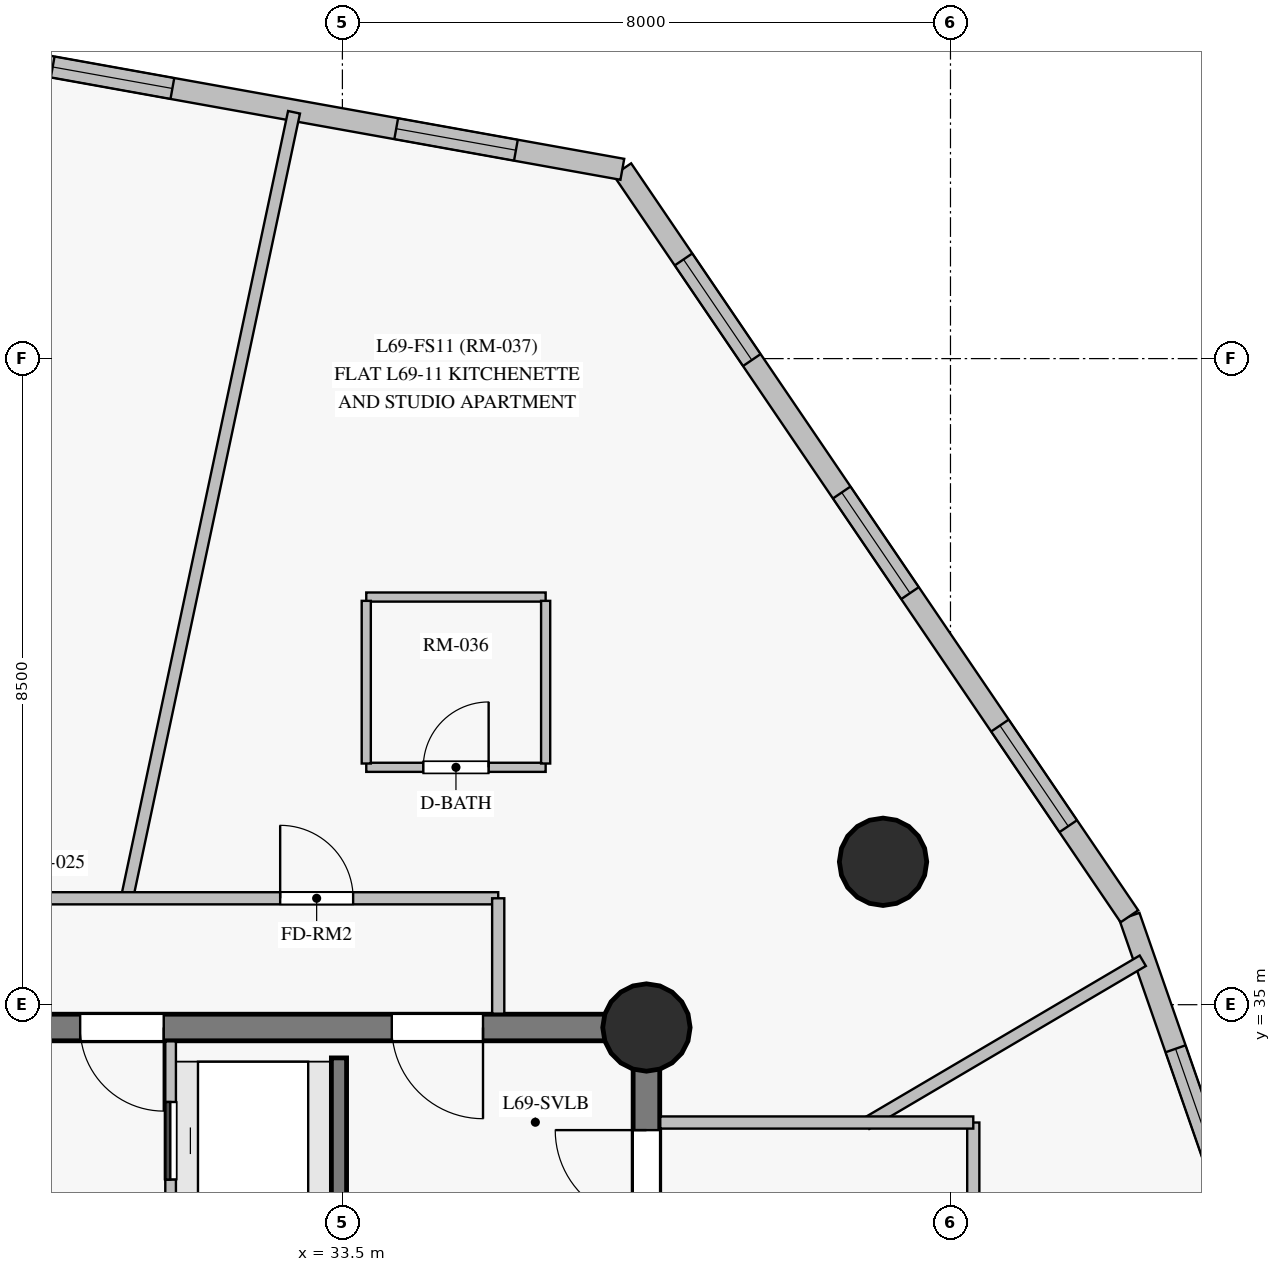
"""IFC4 building model, lengths in metres.
Left out: names, types, materials, properties, quantities, classifications, styles, units other than length and angle.
Written with IfcOpenShell. Run it as: python <this file> out.ifc"""

import sys

from ifc_helpers import new_model, si_unit, direction, frame, frame_2d, origin, origin_with_axes, origin_2d, place, context, subcontext, project, spatial, rectangle, circle, extrude, source, transform, mapped, element, fill, save


model = new_model("IFC4")
c1 = context("Model", 3, precision=1e-05, world=origin(), true_north=direction((0.0, 1.0)))
c2 = subcontext(c1, "Body", "Model", "MODEL_VIEW")
j1 = project(units=[si_unit("LENGTHUNIT", "METRE"), si_unit("PLANEANGLEUNIT", "RADIAN")], contexts=[c1])
p1 = place(None, origin())
s1 = spatial("IfcSite", under=j1, at=p1, CompositionType="ELEMENT")
p2 = place(p1, origin())
s2 = spatial("IfcBuilding", under=s1, at=p2, CompositionType="ELEMENT")
p3 = place(p2, frame((0.0, 0.0, 235.2)))
s3 = spatial("IfcBuildingStorey", under=s2, at=p3, CompositionType="ELEMENT", Elevation=235.2)
p4 = place(p3, frame((37.5, 18.3, 0.0), z_axis=(0.0, 0.0, 1.0), x_axis=(0.0, 1.0, 0.0)))
e1 = element("IfcWall", 1, at=p4, inside=s3, PredefinedType="SHEAR", context=c2, shape_type="SweptSolid", body=[
    extrude(rectangle(XDim=16.4, YDim=0.35, at=frame_2d((8.2, 0.0))), origin(), (0.0, 0.0, 1.0), 2.85),
])
p5 = place(p4, frame((13.85, 0.0, 0.0)))
e2 = element("IfcOpeningElement", 2, at=p5, cuts=e1, PredefinedType="OPENING", context=c2, shape_type="SweptSolid", body=[
    extrude(rectangle(XDim=1.2, YDim=2.15, at=frame_2d((0.6, 1.075))), frame((0.0, 0.185, 0.0), z_axis=(0.0, -1.0, 0.0), x_axis=(1.0, 0.0, 0.0)), (0.0, 0.0, 1.0), 0.37),
])
p6 = place(p3, frame((37.5, 34.7, 0.0), z_axis=(0.0, 0.0, 1.0), x_axis=(-1.0, 0.0, 0.0)))
e3 = element("IfcWall", 3, at=p6, inside=s3, PredefinedType="SHEAR", context=c2, shape_type="SweptSolid", body=[
    extrude(rectangle(XDim=10.95, YDim=0.35, at=frame_2d((5.475, 0.0))), origin(), (0.0, 0.0, 1.0), 2.85),
])
p7 = place(p6, frame((2.15, 0.0, 0.0)))
e4 = element("IfcOpeningElement", 4, at=p7, cuts=e3, PredefinedType="OPENING", context=c2, shape_type="SweptSolid", body=[
    extrude(rectangle(XDim=1.2, YDim=2.15, at=frame_2d((0.6, 1.075))), frame((0.0, 0.185, 0.0), z_axis=(0.0, -1.0, 0.0), x_axis=(1.0, 0.0, 0.0)), (0.0, 0.0, 1.0), 0.37),
])
p8 = place(p6, frame((6.35, 0.0, 0.0)))
e5 = element("IfcOpeningElement", 5, at=p8, cuts=e3, PredefinedType="OPENING", context=c2, shape_type="SweptSolid", body=[
    extrude(rectangle(XDim=1.1, YDim=2.15, at=frame_2d((0.55, 1.075))), frame((0.0, 0.185, 0.0), z_axis=(0.0, -1.0, 0.0), x_axis=(1.0, 0.0, 0.0)), (0.0, 0.0, 1.0), 0.37),
])
m1 = source(origin_with_axes(), c2, "Body", "SweptSolid", [
    extrude(circle(Radius=0.575, at=origin_2d()), origin(), (0.0, 0.0, 1.0), 3.05),
])
for number, where, z_axis, x_axis in (
    (6, (37.5, 34.7, 0.0), (0.0, 0.0, 1.0), (1.0, 0.0, 0.0)),
    (7, (40.613, 36.88, 0.0), (0.0, 0.0, 1.0), (1.0, 0.0, 0.0)),
):
    element("IfcColumn", number, at=place(p3, frame(where, z_axis=z_axis, x_axis=x_axis)), inside=s3, PredefinedType="COLUMN", context=c2, shape_type="MappedRepresentation", body=[
        mapped(m1, transform((0.0, 0.0, 0.0), scale=1.0)),
    ])
p9 = place(p3, frame((46.535, 28.465, 0.0), z_axis=(0.0, 0.0, 1.0), x_axis=(-0.328877219654, 0.944372688292, 0.0)))
e8 = element("IfcWall", 8, at=p9, inside=s3, PredefinedType="SOLIDWALL", context=c2, shape_type="SweptSolid", body=[
    extrude(rectangle(XDim=8.152, YDim=0.28, at=frame_2d((4.076, 0.0))), origin(), (0.0, 0.0, 1.0), 2.85),
])
p10 = place(p9, frame((1.289, 0.0, 0.85)))
e9 = element("IfcOpeningElement", 9, at=p10, cuts=e8, PredefinedType="OPENING", context=c2, shape_type="SweptSolid", body=[
    extrude(rectangle(XDim=1.6, YDim=1.6, at=frame_2d((0.8, 0.8))), frame((0.0, 0.15, 0.0), z_axis=(0.0, -1.0, 0.0), x_axis=(1.0, 0.0, 0.0)), (0.0, 0.0, 1.0), 0.3),
])
p11 = place(p9, frame((4.706, 0.0, 0.85)))
e10 = element("IfcOpeningElement", 10, at=p11, cuts=e8, PredefinedType="OPENING", context=c2, shape_type="SweptSolid", body=[
    extrude(rectangle(XDim=1.6, YDim=1.6, at=frame_2d((0.8, 0.8))), frame((0.0, 0.15, 0.0), z_axis=(0.0, -1.0, 0.0), x_axis=(1.0, 0.0, 0.0)), (0.0, 0.0, 1.0), 0.3),
])
p12 = place(p3, frame((43.854, 36.163, 0.0), z_axis=(0.0, 0.0, 1.0), x_axis=(-0.561648682989, 0.827375825666, 0.0)))
e11 = element("IfcWall", 11, at=p12, inside=s3, PredefinedType="SOLIDWALL", context=c2, shape_type="SweptSolid", body=[
    extrude(rectangle(XDim=11.878, YDim=0.28, at=frame_2d((5.939, 0.0))), origin(), (0.0, 0.0, 1.0), 2.85),
])
p13 = place(p12, frame((1.433, 0.0, 0.85)))
e12 = element("IfcOpeningElement", 12, at=p13, cuts=e11, PredefinedType="OPENING", context=c2, shape_type="SweptSolid", body=[
    extrude(rectangle(XDim=1.6, YDim=1.6, at=frame_2d((0.8, 0.8))), frame((0.0, 0.15, 0.0), z_axis=(0.0, -1.0, 0.0), x_axis=(1.0, 0.0, 0.0)), (0.0, 0.0, 1.0), 0.3),
])
p14 = place(p12, frame((5.139, 0.0, 0.85)))
e13 = element("IfcOpeningElement", 13, at=p14, cuts=e11, PredefinedType="OPENING", context=c2, shape_type="SweptSolid", body=[
    extrude(rectangle(XDim=1.6, YDim=1.6, at=frame_2d((0.8, 0.8))), frame((0.0, 0.15, 0.0), z_axis=(0.0, -1.0, 0.0), x_axis=(1.0, 0.0, 0.0)), (0.0, 0.0, 1.0), 0.3),
])
p15 = place(p12, frame((8.845, 0.0, 0.85)))
e14 = element("IfcOpeningElement", 14, at=p15, cuts=e11, PredefinedType="OPENING", context=c2, shape_type="SweptSolid", body=[
    extrude(rectangle(XDim=1.6, YDim=1.6, at=frame_2d((0.8, 0.8))), frame((0.0, 0.15, 0.0), z_axis=(0.0, -1.0, 0.0), x_axis=(1.0, 0.0, 0.0)), (0.0, 0.0, 1.0), 0.3),
])
p16 = place(p3, frame((37.183, 45.99, 0.0), z_axis=(0.0, 0.0, 1.0), x_axis=(-0.984240187571, 0.176836798124, 0.0)))
e15 = element("IfcWall", 15, at=p16, inside=s3, PredefinedType="SOLIDWALL", context=c2, shape_type="SweptSolid", body=[
    extrude(rectangle(XDim=9.304, YDim=0.28, at=frame_2d((4.652, 0.0))), origin(), (0.0, 0.0, 1.0), 2.85),
])
p17 = place(p16, frame((1.423, 0.0, 0.85)))
e16 = element("IfcOpeningElement", 16, at=p17, cuts=e15, PredefinedType="OPENING", context=c2, shape_type="SweptSolid", body=[
    extrude(rectangle(XDim=1.6, YDim=1.6, at=frame_2d((0.8, 0.8))), frame((0.0, 0.15, 0.0), z_axis=(0.0, -1.0, 0.0), x_axis=(1.0, 0.0, 0.0)), (0.0, 0.0, 1.0), 0.3),
])
p18 = place(p16, frame((6.014, 0.0, 0.85)))
e17 = element("IfcOpeningElement", 17, at=p18, cuts=e15, PredefinedType="OPENING", context=c2, shape_type="SweptSolid", body=[
    extrude(rectangle(XDim=1.6, YDim=1.6, at=frame_2d((0.8, 0.8))), frame((0.0, 0.15, 0.0), z_axis=(0.0, -1.0, 0.0), x_axis=(1.0, 0.0, 0.0)), (0.0, 0.0, 1.0), 0.3),
])
p19 = place(p3, frame((33.455, 18.7, 0.0), z_axis=(0.0, 0.0, 1.0), x_axis=(0.0, 1.0, 0.0)))
e18 = element("IfcWall", 18, at=p19, inside=s3, PredefinedType="SHEAR", context=c2, shape_type="SweptSolid", body=[
    extrude(rectangle(XDim=15.6, YDim=0.2, at=frame_2d((7.8, 0.0))), origin(), (0.0, 0.0, 1.0), 2.85),
])
p20 = place(p19, frame((2.75, 0.0, 0.0)))
e19 = element("IfcOpeningElement", 19, at=p20, cuts=e18, PredefinedType="OPENING", context=c2, shape_type="SweptSolid", body=[
    extrude(rectangle(XDim=1.15, YDim=2.15, at=frame_2d((0.575, 1.075))), frame((0.0, 0.11, 0.0), z_axis=(0.0, -1.0, 0.0), x_axis=(1.0, 0.0, 0.0)), (0.0, 0.0, 1.0), 0.22),
])
p21 = place(p19, frame((0.55, 0.0, 0.0)))
e20 = element("IfcOpeningElement", 20, at=p21, cuts=e18, PredefinedType="OPENING", context=c2, shape_type="SweptSolid", body=[
    extrude(rectangle(XDim=0.94, YDim=2.1, at=frame_2d((0.47, 1.05))), frame((0.0, 0.11, 0.0), z_axis=(0.0, -1.0, 0.0), x_axis=(1.0, 0.0, 0.0)), (0.0, 0.0, 1.0), 0.22),
])
p22 = place(p3, frame((41.8, 33.45, 0.0), z_axis=(0.0, 0.0, 1.0), x_axis=(0.0, -1.0, 0.0)))
e21 = element("IfcWall", 21, at=p22, inside=s3, PredefinedType="PARTITIONING", context=c2, shape_type="SweptSolid", body=[
    extrude(rectangle(XDim=17.024, YDim=0.16, at=frame_2d((8.512, 0.0))), origin(), (0.0, 0.0, 1.0), 2.3),
])
p23 = place(p22, frame((10.483, 0.0, 0.0)))
e22 = element("IfcOpeningElement", 22, at=p23, cuts=e21, PredefinedType="OPENING", context=c2, shape_type="SweptSolid", body=[
    extrude(rectangle(XDim=0.96, YDim=2.15, at=frame_2d((0.48, 1.075))), frame((0.0, 0.09, 0.0), z_axis=(0.0, -1.0, 0.0), x_axis=(1.0, 0.0, 0.0)), (0.0, 0.0, 1.0), 0.18),
])
p24 = place(p22, frame((7.814, 0.0, 0.0)))
e23 = element("IfcOpeningElement", 23, at=p24, cuts=e21, PredefinedType="OPENING", context=c2, shape_type="SweptSolid", body=[
    extrude(rectangle(XDim=0.96, YDim=2.15, at=frame_2d((0.48, 1.075))), frame((0.0, 0.09, 0.0), z_axis=(0.0, -1.0, 0.0), x_axis=(1.0, 0.0, 0.0)), (0.0, 0.0, 1.0), 0.18),
])
p25 = place(p22, frame((4.835, 0.0, 0.0)))
e24 = element("IfcOpeningElement", 24, at=p25, cuts=e21, PredefinedType="OPENING", context=c2, shape_type="SweptSolid", body=[
    extrude(rectangle(XDim=0.96, YDim=2.15, at=frame_2d((0.48, 1.075))), frame((0.0, 0.09, 0.0), z_axis=(0.0, -1.0, 0.0), x_axis=(1.0, 0.0, 0.0)), (0.0, 0.0, 1.0), 0.18),
])
p26 = place(p3, frame((30.659, 36.371, 0.0), z_axis=(0.0, 0.0, 1.0), x_axis=(0.207921550164, 0.978145505013, 0.0)))
e25 = element("IfcWall", 25, at=p26, inside=s3, PredefinedType="PARTITIONING", context=c2, shape_type="SweptSolid", body=[
    extrude(rectangle(XDim=10.602, YDim=0.16, at=frame_2d((5.301, 0.0))), origin(), (0.0, 0.0, 1.0), 2.85),
])
p27 = place(p3, frame((28.6, 36.4, 0.0), z_axis=(0.0, 0.0, 1.0), x_axis=(1.0, 0.0, 0.0)))
e26 = element("IfcWall", 26, at=p27, inside=s3, PredefinedType="PARTITIONING", context=c2, shape_type="SweptSolid", body=[
    extrude(rectangle(XDim=6.95, YDim=0.16, at=frame_2d((3.475, 0.0))), origin(), (0.0, 0.0, 1.0), 2.45),
])
p28 = place(p27, frame((4.081, 0.0, 0.0)))
e27 = element("IfcOpeningElement", 27, at=p28, cuts=e26, PredefinedType="OPENING", context=c2, shape_type="SweptSolid", body=[
    extrude(rectangle(XDim=0.96, YDim=2.15, at=frame_2d((0.48, 1.075))), frame((0.0, 0.09, 0.0), z_axis=(0.0, -1.0, 0.0), x_axis=(1.0, 0.0, 0.0)), (0.0, 0.0, 1.0), 0.18),
])
p29 = place(p3, frame((40.391, 33.435, 0.0), z_axis=(0.0, 0.0, 1.0), x_axis=(0.861632369313, 0.507532915338, 0.0)))
e28 = element("IfcWall", 28, at=p29, inside=s3, PredefinedType="PARTITIONING", context=c2, shape_type="SweptSolid", body=[
    extrude(rectangle(XDim=4.223, YDim=0.16, at=frame_2d((2.111, 0.0))), origin(), (0.0, 0.0, 1.0), 2.85),
])
p30 = place(p3, frame((37.682, 33.45, 0.0), z_axis=(0.0, 0.0, 1.0), x_axis=(1.0, 0.0, 0.0)))
e29 = element("IfcWall", 29, at=p30, inside=s3, PredefinedType="PARTITIONING", context=c2, shape_type="SweptSolid", body=[
    extrude(rectangle(XDim=4.118, YDim=0.16, at=frame_2d((2.059, 0.0))), origin(), (0.0, 0.0, 1.0), 2.85),
])
p31 = place(p3, frame((31.24, 30.45, 0.0), z_axis=(0.0, 0.0, 1.0), x_axis=(0.0, 1.0, 0.0)))
e30 = element("IfcWall", 30, at=p31, inside=s3, PredefinedType="PARTITIONING", context=c2, shape_type="SweptSolid", body=[
    extrude(rectangle(XDim=4.068, YDim=0.14, at=frame_2d((2.034, 0.0))), origin(), (0.0, 0.0, 1.0), 2.85),
])
p32 = place(p31, frame((0.35, 0.0, 0.0)))
e31 = element("IfcOpeningElement", 31, at=p32, cuts=e30, PredefinedType="OPENING", context=c2, shape_type="SweptSolid", body=[
    extrude(rectangle(XDim=1.02, YDim=2.15, at=frame_2d((0.51, 1.075))), frame((0.0, 0.08, 0.0), z_axis=(0.0, -1.0, 0.0), x_axis=(1.0, 0.0, 0.0)), (0.0, 0.0, 1.0), 0.16),
])
p33 = place(p31, frame((2.25, 0.0, 0.0)))
e32 = element("IfcOpeningElement", 32, at=p33, cuts=e30, PredefinedType="OPENING", context=c2, shape_type="SweptSolid", body=[
    extrude(rectangle(XDim=1.02, YDim=2.15, at=frame_2d((0.51, 1.075))), frame((0.0, 0.08, 0.0), z_axis=(0.0, -1.0, 0.0), x_axis=(1.0, 0.0, 0.0)), (0.0, 0.0, 1.0), 0.16),
])
p34 = place(p3, frame((33.814, 38.123, 0.0), z_axis=(0.0, 0.0, 1.0), x_axis=(1.0, 0.0, 0.0)))
e33 = element("IfcWall", 33, at=p34, inside=s3, PredefinedType="PARTITIONING", context=c2, shape_type="SweptSolid", body=[
    extrude(rectangle(XDim=2.36, YDim=0.12, at=frame_2d((1.18, 0.0))), origin(), (0.0, 0.0, 1.0), 2.3),
])
p35 = place(p34, frame((0.75, 0.0, 0.0)))
e34 = element("IfcOpeningElement", 34, at=p35, cuts=e33, PredefinedType="OPENING", context=c2, shape_type="SweptSolid", body=[
    extrude(rectangle(XDim=0.86, YDim=2.1, at=frame_2d((0.43, 1.05))), frame((0.0, 0.07, 0.0), z_axis=(0.0, -1.0, 0.0), x_axis=(1.0, 0.0, 0.0)), (0.0, 0.0, 1.0), 0.14),
])
p36 = place(p3, frame((36.174, 40.363, 0.0), z_axis=(0.0, 0.0, 1.0), x_axis=(-1.0, 0.0, 0.0)))
e35 = element("IfcWall", 35, at=p36, inside=s3, PredefinedType="PARTITIONING", context=c2, shape_type="SweptSolid", body=[
    extrude(rectangle(XDim=2.36, YDim=0.12, at=frame_2d((1.18, 0.0))), origin(), (0.0, 0.0, 1.0), 2.85),
])
for number, where, z_axis, x_axis in (
    (36, (36.174, 38.173, 0.0), (0.0, 0.0, 1.0), (0.0, 1.0, 0.0)),
    (37, (33.814, 40.313, 0.0), (0.0, 0.0, 1.0), (0.0, -1.0, 0.0)),
):
    element("IfcWall", number, at=place(p3, frame(where, z_axis=z_axis, x_axis=x_axis)), inside=s3, PredefinedType="PARTITIONING", context=c2, shape_type="SweptSolid", body=[
        extrude(rectangle(XDim=2.14, YDim=0.12, at=frame_2d((1.07, 0.0))), origin(), (0.0, 0.0, 1.0), 2.85),
    ])
p37 = place(p3, frame((35.55, 36.4, 0.0), z_axis=(0.0, 0.0, 1.0), x_axis=(0.0, -1.0, 0.0)))
e38 = element("IfcWall", 38, at=p37, inside=s3, PredefinedType="PARTITIONING", context=c2, shape_type="SweptSolid", body=[
    extrude(rectangle(XDim=1.518, YDim=0.16, at=frame_2d((0.759, 0.0))), origin(), (0.0, 0.0, 1.0), 2.85),
])
m2 = source(origin_with_axes(), c2, "Body", "SweptSolid", [
    extrude(rectangle(XDim=1.6, YDim=1.6, at=frame_2d((0.8, 0.8))), frame((0.0, 0.03, 0.0), z_axis=(0.0, -1.0, 0.0), x_axis=(1.0, 0.0, 0.0)), (0.0, 0.0, 1.0), 0.06),
])
p38 = place(p11, origin())
e39 = element("IfcWindow", 39, at=p38, inside=s3, PartitioningType="SINGLE_PANEL", PredefinedType="WINDOW", context=c2, shape_type="MappedRepresentation", body=[
    mapped(m2, transform((0.0, 0.0, 0.0), scale=1.0)),
])
fill(e10, e39)
p39 = place(p13, origin())
e40 = element("IfcWindow", 40, at=p39, inside=s3, PartitioningType="SINGLE_PANEL", PredefinedType="WINDOW", context=c2, shape_type="MappedRepresentation", body=[
    mapped(m2, transform((0.0, 0.0, 0.0), scale=1.0)),
])
fill(e12, e40)
p40 = place(p14, origin())
e41 = element("IfcWindow", 41, at=p40, inside=s3, PartitioningType="SINGLE_PANEL", PredefinedType="WINDOW", context=c2, shape_type="MappedRepresentation", body=[
    mapped(m2, transform((0.0, 0.0, 0.0), scale=1.0)),
])
fill(e13, e41)
p41 = place(p15, origin())
e42 = element("IfcWindow", 42, at=p41, inside=s3, PartitioningType="SINGLE_PANEL", PredefinedType="WINDOW", context=c2, shape_type="MappedRepresentation", body=[
    mapped(m2, transform((0.0, 0.0, 0.0), scale=1.0)),
])
fill(e14, e42)
p42 = place(p17, origin())
e43 = element("IfcWindow", 43, at=p42, inside=s3, PartitioningType="SINGLE_PANEL", PredefinedType="WINDOW", context=c2, shape_type="MappedRepresentation", body=[
    mapped(m2, transform((0.0, 0.0, 0.0), scale=1.0)),
])
fill(e16, e43)
p43 = place(p18, origin())
e44 = element("IfcWindow", 44, at=p43, inside=s3, PartitioningType="SINGLE_PANEL", PredefinedType="WINDOW", context=c2, shape_type="MappedRepresentation", body=[
    mapped(m2, transform((0.0, 0.0, 0.0), scale=1.0)),
])
fill(e17, e44)
m3 = source(origin_with_axes(), c2, "Body", "SweptSolid", [
    extrude(rectangle(XDim=1.2, YDim=2.15, at=frame_2d((0.6, 1.075))), frame((0.0, 0.025, 0.0), z_axis=(0.0, -1.0, 0.0), x_axis=(1.0, 0.0, 0.0)), (0.0, 0.0, 1.0), 0.05),
])
p44 = place(p5, origin())
e45 = element("IfcDoor", 45, at=p44, inside=s3, OperationType="SINGLE_SWING_RIGHT", PredefinedType="DOOR", context=c2, shape_type="MappedRepresentation", body=[
    mapped(m3, transform((0.0, 0.0, 0.0), scale=1.0)),
])
fill(e2, e45)
p45 = place(p7, origin())
e46 = element("IfcDoor", 46, at=p45, inside=s3, OperationType="SINGLE_SWING_LEFT", PredefinedType="DOOR", context=c2, shape_type="MappedRepresentation", body=[
    mapped(m3, transform((0.0, 0.0, 0.0), scale=1.0)),
])
fill(e4, e46)
m4 = source(origin_with_axes(), c2, "Body", "SweptSolid", [
    extrude(rectangle(XDim=1.1, YDim=2.15, at=frame_2d((0.55, 1.075))), frame((0.0, 0.025, 0.0), z_axis=(0.0, -1.0, 0.0), x_axis=(1.0, 0.0, 0.0)), (0.0, 0.0, 1.0), 0.05),
])
p46 = place(p8, origin())
e47 = element("IfcDoor", 47, at=p46, inside=s3, OperationType="SINGLE_SWING_LEFT", PredefinedType="DOOR", context=c2, shape_type="MappedRepresentation", body=[
    mapped(m4, transform((0.0, 0.0, 0.0), scale=1.0)),
])
fill(e5, e47)
m5 = source(origin_with_axes(), c2, "Body", "SweptSolid", [
    extrude(rectangle(XDim=1.02, YDim=2.15, at=frame_2d((0.51, 1.075))), frame((0.0, 0.025, 0.0), z_axis=(0.0, -1.0, 0.0), x_axis=(1.0, 0.0, 0.0)), (0.0, 0.0, 1.0), 0.05),
])
p47 = place(p33, origin())
e48 = element("IfcDoor", 48, at=p47, inside=s3, OperationType="SLIDING_TO_LEFT", PredefinedType="DOOR", context=c2, shape_type="MappedRepresentation", body=[
    mapped(m5, transform((0.0, 0.0, 0.0), scale=1.0)),
])
fill(e32, e48)
m6 = source(origin_with_axes(), c2, "Body", "SweptSolid", [
    extrude(rectangle(XDim=0.86, YDim=2.1, at=frame_2d((0.43, 1.05))), frame((0.0, 0.025, 0.0), z_axis=(0.0, -1.0, 0.0), x_axis=(1.0, 0.0, 0.0)), (0.0, 0.0, 1.0), 0.05),
])
p48 = place(p35, origin())
e49 = element("IfcDoor", 49, at=p48, inside=s3, OperationType="SINGLE_SWING_RIGHT", PredefinedType="DOOR", context=c2, shape_type="MappedRepresentation", body=[
    mapped(m6, transform((0.0, 0.0, 0.0), scale=1.0)),
])
fill(e34, e49)
m7 = source(origin_with_axes(), c2, "Body", "SweptSolid", [
    extrude(rectangle(XDim=0.96, YDim=2.15, at=frame_2d((0.48, 1.075))), frame((0.0, 0.025, 0.0), z_axis=(0.0, -1.0, 0.0), x_axis=(1.0, 0.0, 0.0)), (0.0, 0.0, 1.0), 0.05),
])
p49 = place(p28, origin())
e50 = element("IfcDoor", 50, at=p49, inside=s3, OperationType="SINGLE_SWING_LEFT", PredefinedType="DOOR", context=c2, shape_type="MappedRepresentation", body=[
    mapped(m7, transform((0.0, 0.0, 0.0), scale=1.0)),
])
fill(e27, e50)
save(model, sys.argv[1])
